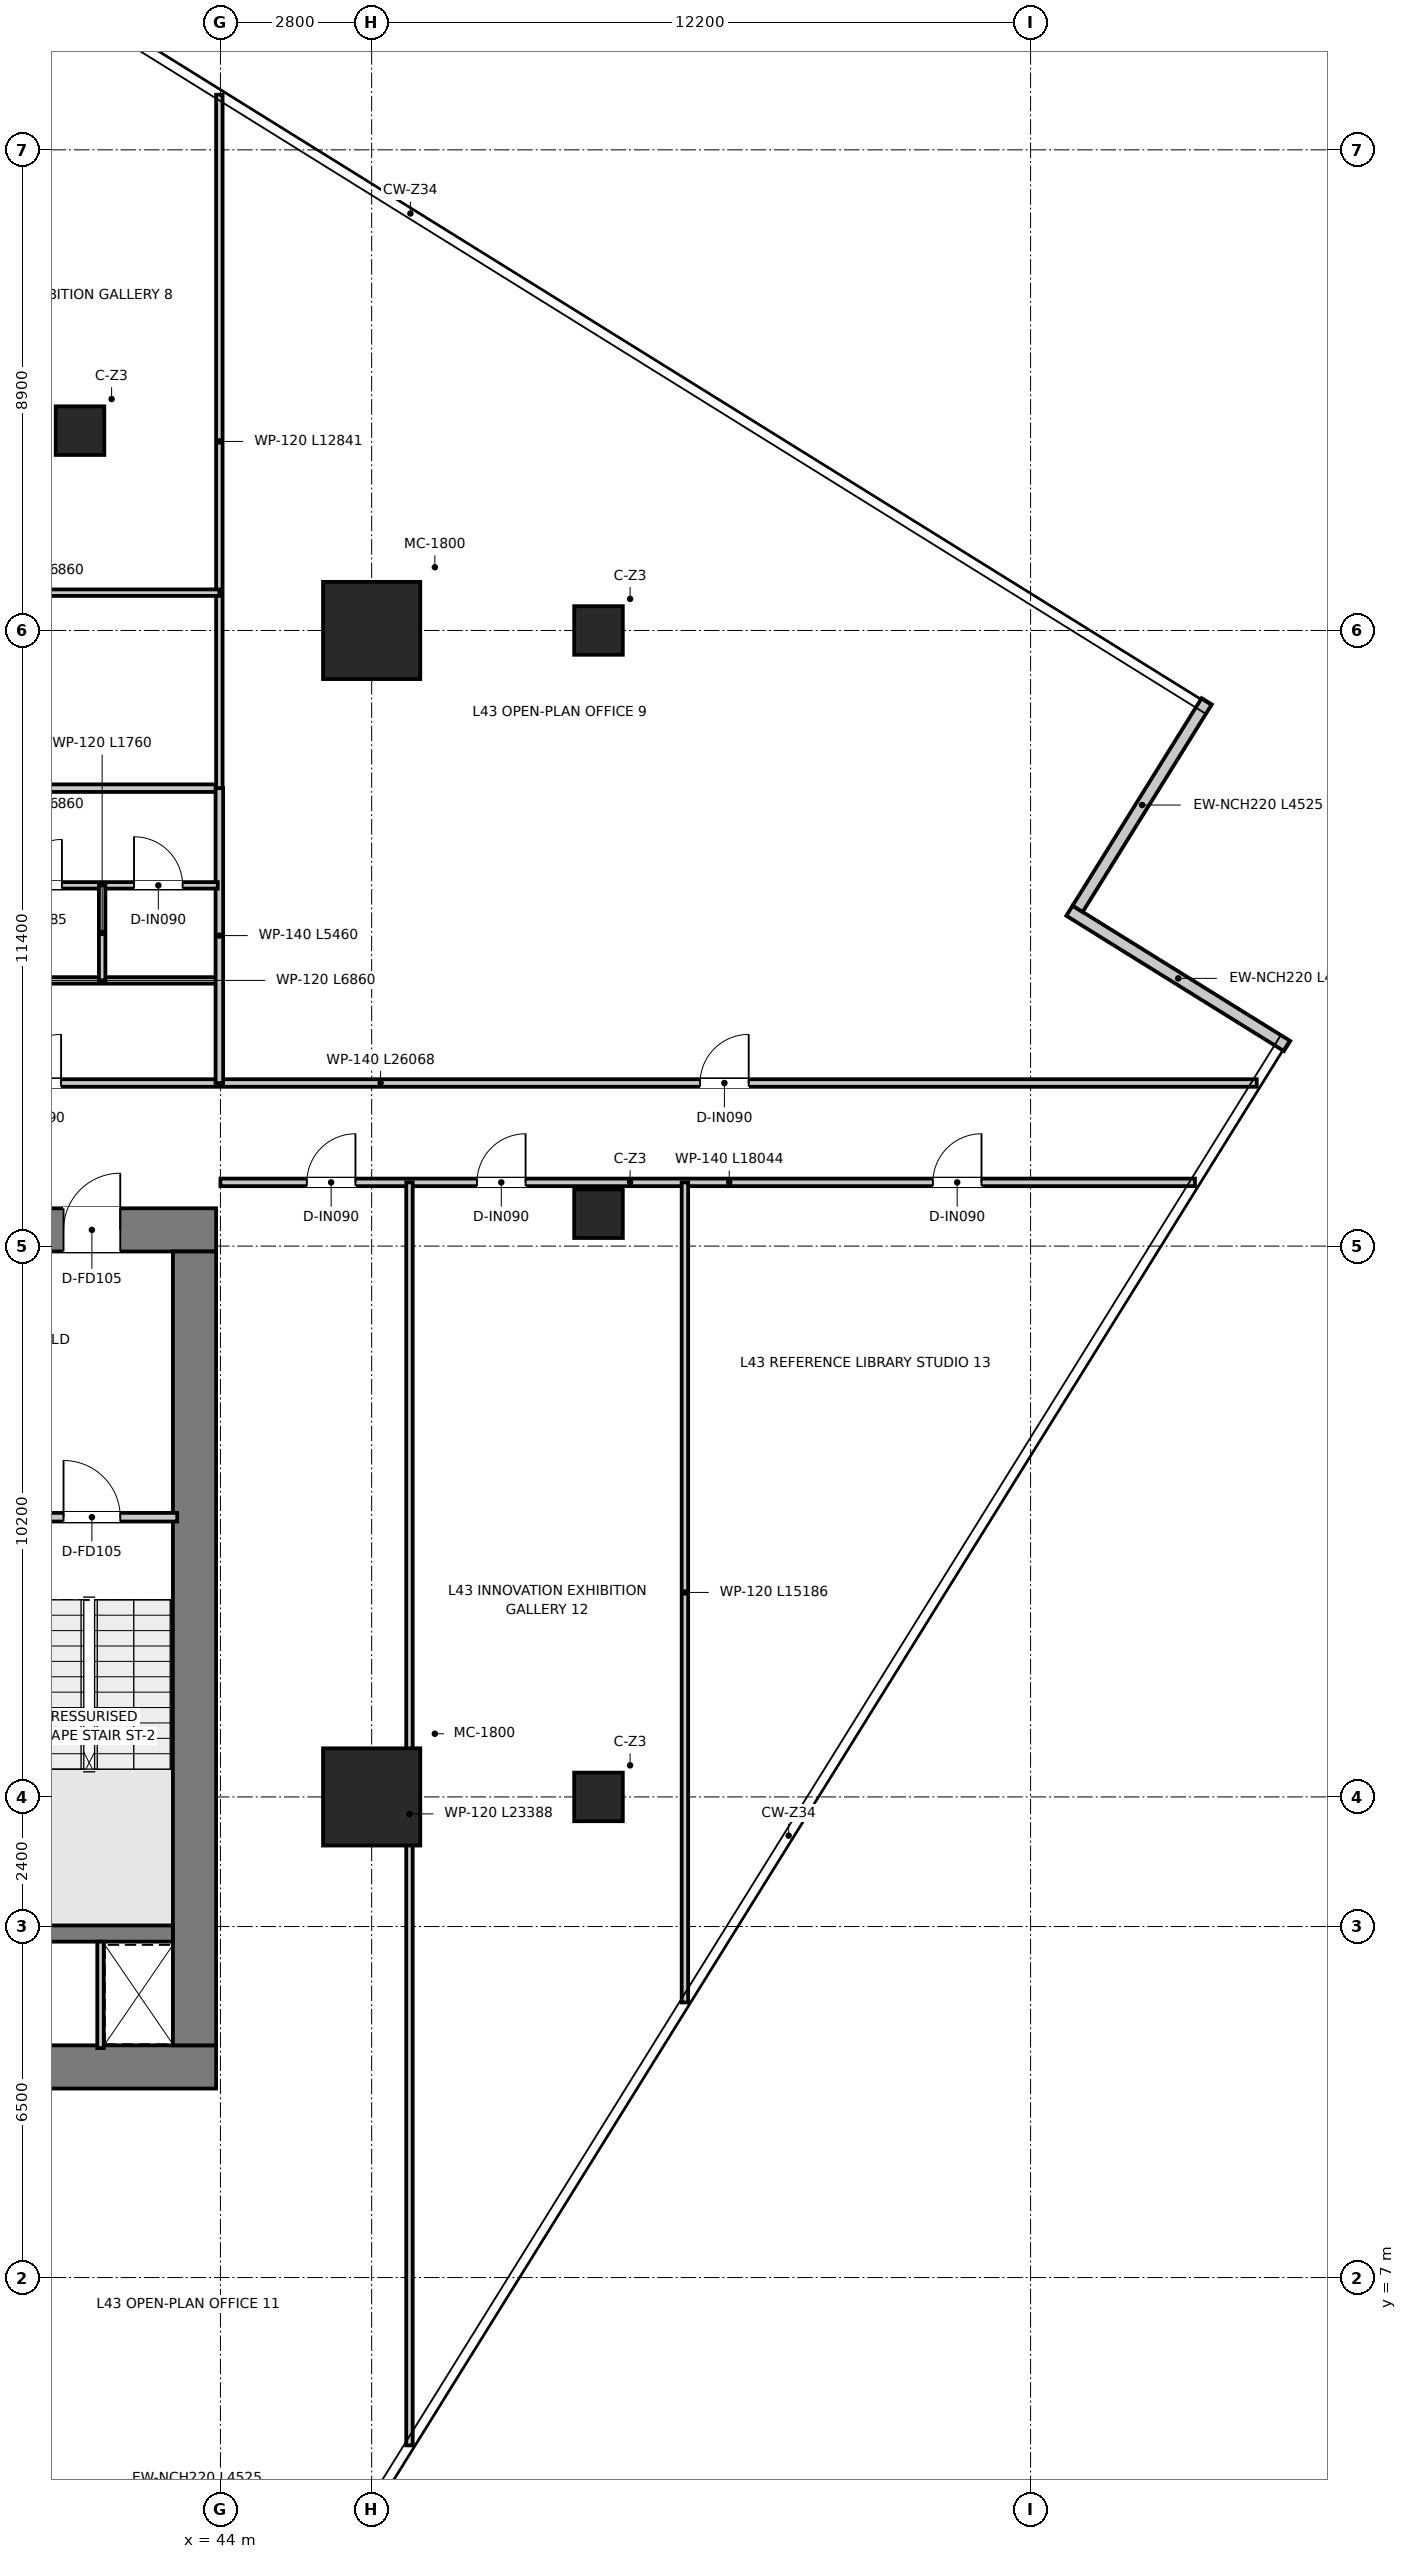
"""IFC4 building model, lengths in metres.
Left out: names, types, materials, properties, quantities, classifications, styles, units other than length and angle.
Written with IfcOpenShell. Run it as: python <this file> out.ifc"""

import sys

from ifc_helpers import new_model, si_unit, direction, frame, frame_2d, origin, origin_2d, place, context, subcontext, project, spatial, rectangle, extrude, source, transform, mapped, element, fill, save


model = new_model("IFC4")
c1 = context("Model", 3, precision=1e-05, world=origin(), true_north=direction((0.0, 1.0)))
c2 = subcontext(c1, "Body", "Model", "MODEL_VIEW")
j1 = project(units=[si_unit("LENGTHUNIT", "METRE"), si_unit("PLANEANGLEUNIT", "RADIAN")], contexts=[c1])
p1 = place(None, origin())
s1 = spatial("IfcSite", under=j1, at=p1, CompositionType="ELEMENT")
p2 = place(p1, origin())
s2 = spatial("IfcBuilding", under=s1, at=p2, CompositionType="ELEMENT")
p3 = place(p2, frame((0.0, 0.0, 177.8)))
s3 = spatial("IfcBuildingStorey", under=s2, at=p3, CompositionType="ELEMENT", Elevation=177.8)
p4 = place(p3, frame((28.08, 10.9, 0.0), z_axis=(0.0, 0.0, 1.0), x_axis=(1.0, 0.0, 0.0)))
e1 = element("IfcWall", 1, at=p4, inside=s3, PredefinedType="SHEAR", context=c2, shape_type="SweptSolid", body=[
    extrude(rectangle(XDim=15.84, YDim=0.8, at=frame_2d((7.92, 0.0))), origin(), (0.0, 0.0, 1.0), 3.95),
])
p5 = place(p3, frame((28.08, 26.4, 0.0), z_axis=(0.0, 0.0, 1.0), x_axis=(1.0, 0.0, 0.0)))
e2 = element("IfcWall", 2, at=p5, inside=s3, PredefinedType="SHEAR", context=c2, shape_type="SweptSolid", body=[
    extrude(rectangle(XDim=15.84, YDim=0.8, at=frame_2d((7.92, 0.0))), origin(), (0.0, 0.0, 1.0), 3.95),
])
p6 = place(p5, frame((7.22, 0.0, 0.0)))
e3 = element("IfcOpeningElement", 3, at=p6, cuts=e2, PredefinedType="OPENING", context=c2, shape_type="SweptSolid", body=[
    extrude(rectangle(XDim=1.4, YDim=2.2, at=frame_2d((0.7, 1.1))), frame((0.0, 0.41, 0.0), z_axis=(0.0, -1.0, 0.0), x_axis=(1.0, 0.0, 0.0)), (0.0, 0.0, 1.0), 0.82),
])
p7 = place(p5, frame((1.775, 0.0, 0.0)))
e4 = element("IfcOpeningElement", 4, at=p7, cuts=e2, PredefinedType="OPENING", context=c2, shape_type="SweptSolid", body=[
    extrude(rectangle(XDim=1.05, YDim=2.1, at=frame_2d((0.525, 1.05))), frame((0.0, 0.41, 0.0), z_axis=(0.0, -1.0, 0.0), x_axis=(1.0, 0.0, 0.0)), (0.0, 0.0, 1.0), 0.82),
])
p8 = place(p5, frame((13.015, 0.0, 0.0)))
e5 = element("IfcOpeningElement", 5, at=p8, cuts=e2, PredefinedType="OPENING", context=c2, shape_type="SweptSolid", body=[
    extrude(rectangle(XDim=1.05, YDim=2.1, at=frame_2d((0.525, 1.05))), frame((0.0, 0.41, 0.0), z_axis=(0.0, -1.0, 0.0), x_axis=(1.0, 0.0, 0.0)), (0.0, 0.0, 1.0), 0.82),
])
p9 = place(p3, frame((43.52, 11.3, 0.0), z_axis=(0.0, 0.0, 1.0), x_axis=(0.0, 1.0, 0.0)))
e6 = element("IfcWall", 6, at=p9, inside=s3, PredefinedType="SHEAR", context=c2, shape_type="SweptSolid", body=[
    extrude(rectangle(XDim=14.7, YDim=0.8, at=frame_2d((7.35, 0.0))), origin(), (0.0, 0.0, 1.0), 3.95),
])
p10 = place(p3, frame((40.02, 13.37, 0.0), z_axis=(0.0, 0.0, 1.0), x_axis=(1.0, 0.0, 0.0)))
e7 = element("IfcWall", 7, at=p10, inside=s3, PredefinedType="SHEAR", context=c2, shape_type="SweptSolid", body=[
    extrude(rectangle(XDim=3.1, YDim=0.3, at=frame_2d((1.55, 0.0))), origin(), (0.0, 0.0, 1.0), 3.95),
])
m1 = source(origin(), c2, "Body", "SweptSolid", [
    extrude(rectangle(XDim=1.8, YDim=1.8, at=origin_2d()), origin(), (0.0, 0.0, 1.0), 3.95),
])
for number, where, z_axis, x_axis in (
    (8, (46.8, 15.9, 0.0), (0.0, 0.0, 1.0), (1.0, 0.0, 0.0)),
    (9, (46.8, 37.5, 0.0), (0.0, 0.0, 1.0), (1.0, 0.0, 0.0)),
):
    element("IfcColumn", number, at=place(p3, frame(where, z_axis=z_axis, x_axis=x_axis)), inside=s3, PredefinedType="USERDEFINED", context=c2, shape_type="MappedRepresentation", body=[
        mapped(m1, transform((0.0, 0.0, 0.0), x_axis=(1.0, 0.0, 0.0), y_axis=(0.0, 1.0, 0.0), z_axis=(0.0, 0.0, 1.0), scale=1.0)),
    ])
m2 = source(origin(), c2, "Body", "SweptSolid", [
    extrude(rectangle(XDim=0.9, YDim=0.9, at=origin_2d()), origin(), (0.0, 0.0, 1.0), 3.95),
])
for number, where, z_axis, x_axis in (
    (10, (41.4, 41.2, 0.0), (0.0, 0.0, 1.0), (1.0, 0.0, 0.0)),
    (11, (51.0, 37.5, 0.0), (0.0, 0.0, 1.0), (1.0, 0.0, 0.0)),
    (12, (51.0, 26.7, 0.0), (0.0, 0.0, 1.0), (1.0, 0.0, 0.0)),
    (13, (51.0, 15.9, 0.0), (0.0, 0.0, 1.0), (1.0, 0.0, 0.0)),
):
    element("IfcColumn", number, at=place(p3, frame(where, z_axis=z_axis, x_axis=x_axis)), inside=s3, PredefinedType="COLUMN", context=c2, shape_type="MappedRepresentation", body=[
        mapped(m2, transform((0.0, 0.0, 0.0), x_axis=(1.0, 0.0, 0.0), y_axis=(0.0, 1.0, 0.0), z_axis=(0.0, 0.0, 1.0), scale=1.0)),
    ])
p11 = place(p3, frame((63.749, 29.805, 0.0), z_axis=(0.0, 0.0, 1.0), x_axis=(-0.84921299194, 0.528050465694, 0.0)))
e14 = element("IfcWall", 14, at=p11, inside=s3, PredefinedType="ELEMENTEDWALL", context=c2, shape_type="SweptSolid", body=[
    extrude(rectangle(XDim=4.745, YDim=0.22, at=frame_2d((2.373, 0.0))), origin(), (0.0, 0.0, 1.0), 3.67),
])
p12 = place(p3, frame((59.871, 32.346, 0.0), z_axis=(0.0, 0.0, 1.0), x_axis=(0.528062437074, 0.849205547881, 0.0)))
e15 = element("IfcWall", 15, at=p12, inside=s3, PredefinedType="ELEMENTEDWALL", context=c2, shape_type="SweptSolid", body=[
    extrude(rectangle(XDim=4.525, YDim=0.22, at=frame_2d((2.262, 0.0))), origin(), (0.0, 0.0, 1.0), 3.67),
])
p13 = place(p3, frame((40.04, 21.08, 0.0), z_axis=(0.0, 0.0, 1.0), x_axis=(1.0, 0.0, 0.0)))
e16 = element("IfcWall", 16, at=p13, inside=s3, PredefinedType="PARTITIONING", context=c2, shape_type="SweptSolid", body=[
    extrude(rectangle(XDim=3.16, YDim=0.16, at=frame_2d((1.58, 0.0))), origin(), (0.0, 0.0, 1.0), 3.67),
])
p14 = place(p13, frame((1.055, 0.0, 0.0)))
e17 = element("IfcOpeningElement", 17, at=p14, cuts=e16, PredefinedType="OPENING", context=c2, shape_type="SweptSolid", body=[
    extrude(rectangle(XDim=1.05, YDim=2.1, at=frame_2d((0.525, 1.05))), frame((0.0, 0.09, 0.0), z_axis=(0.0, -1.0, 0.0), x_axis=(1.0, 0.0, 0.0)), (0.0, 0.0, 1.0), 0.18),
])
p15 = place(p3, frame((41.78, 11.25, 0.0), z_axis=(0.0, 0.0, 1.0), x_axis=(0.0, 1.0, 0.0)))
e18 = element("IfcWall", 18, at=p15, inside=s3, PredefinedType="PARTITIONING", context=c2, shape_type="SweptSolid", body=[
    extrude(rectangle(XDim=1.97, YDim=0.12, at=frame_2d((0.985, 0.0))), origin(), (0.0, 0.0, 1.0), 3.67),
])
p16 = place(p3, frame((37.12, 29.12, 0.0), z_axis=(0.0, 0.0, 1.0), x_axis=(1.0, 0.0, 0.0)))
e19 = element("IfcWall", 19, at=p16, inside=s3, PredefinedType="PARTITIONING", context=c2, shape_type="SweptSolid", body=[
    extrude(rectangle(XDim=26.068, YDim=0.14, at=frame_2d((13.034, 0.0))), origin(), (0.0, 0.0, 1.0), 3.03),
])
p17 = place(p16, frame((3.03, 0.0, 0.0)))
e20 = element("IfcOpeningElement", 20, at=p17, cuts=e19, PredefinedType="OPENING", context=c2, shape_type="SweptSolid", body=[
    extrude(rectangle(XDim=0.9, YDim=2.1, at=frame_2d((0.45, 1.05))), frame((0.0, 0.08, 0.0), z_axis=(0.0, -1.0, 0.0), x_axis=(1.0, 0.0, 0.0)), (0.0, 0.0, 1.0), 0.16),
])
p18 = place(p16, frame((15.761, 0.0, 0.0)))
e21 = element("IfcOpeningElement", 21, at=p18, cuts=e19, PredefinedType="OPENING", context=c2, shape_type="SweptSolid", body=[
    extrude(rectangle(XDim=0.9, YDim=2.1, at=frame_2d((0.45, 1.05))), frame((0.0, 0.08, 0.0), z_axis=(0.0, -1.0, 0.0), x_axis=(1.0, 0.0, 0.0)), (0.0, 0.0, 1.0), 0.16),
])
p19 = place(p3, frame((44.0, 27.28, 0.0), z_axis=(0.0, 0.0, 1.0), x_axis=(1.0, 0.0, 0.0)))
e22 = element("IfcWall", 22, at=p19, inside=s3, PredefinedType="PARTITIONING", context=c2, shape_type="SweptSolid", body=[
    extrude(rectangle(XDim=18.044, YDim=0.14, at=frame_2d((9.022, 0.0))), origin(), (0.0, 0.0, 1.0), 3.03),
])
p20 = place(p19, frame((1.6, 0.0, 0.0)))
e23 = element("IfcOpeningElement", 23, at=p20, cuts=e22, PredefinedType="OPENING", context=c2, shape_type="SweptSolid", body=[
    extrude(rectangle(XDim=0.9, YDim=2.1, at=frame_2d((0.45, 1.05))), frame((0.0, 0.08, 0.0), z_axis=(0.0, -1.0, 0.0), x_axis=(1.0, 0.0, 0.0)), (0.0, 0.0, 1.0), 0.16),
])
p21 = place(p19, frame((4.75, 0.0, 0.0)))
e24 = element("IfcOpeningElement", 24, at=p21, cuts=e22, PredefinedType="OPENING", context=c2, shape_type="SweptSolid", body=[
    extrude(rectangle(XDim=0.9, YDim=2.1, at=frame_2d((0.45, 1.05))), frame((0.0, 0.08, 0.0), z_axis=(0.0, -1.0, 0.0), x_axis=(1.0, 0.0, 0.0)), (0.0, 0.0, 1.0), 0.16),
])
p22 = place(p19, frame((13.191, 0.0, 0.0)))
e25 = element("IfcOpeningElement", 25, at=p22, cuts=e22, PredefinedType="OPENING", context=c2, shape_type="SweptSolid", body=[
    extrude(rectangle(XDim=0.9, YDim=2.1, at=frame_2d((0.45, 1.05))), frame((0.0, 0.08, 0.0), z_axis=(0.0, -1.0, 0.0), x_axis=(1.0, 0.0, 0.0)), (0.0, 0.0, 1.0), 0.16),
])
p23 = place(p3, frame((37.12, 31.02, 0.0), z_axis=(0.0, 0.0, 1.0), x_axis=(1.0, 0.0, 0.0)))
e26 = element("IfcWall", 26, at=p23, inside=s3, PredefinedType="PARTITIONING", context=c2, shape_type="SweptSolid", body=[
    extrude(rectangle(XDim=6.86, YDim=0.12, at=frame_2d((3.43, 0.0))), origin(), (0.0, 0.0, 1.0), 3.08),
])
p24 = place(p3, frame((37.12, 34.58, 0.0), z_axis=(0.0, 0.0, 1.0), x_axis=(1.0, 0.0, 0.0)))
e27 = element("IfcWall", 27, at=p24, inside=s3, PredefinedType="PARTITIONING", context=c2, shape_type="SweptSolid", body=[
    extrude(rectangle(XDim=6.86, YDim=0.14, at=frame_2d((3.43, 0.0))), origin(), (0.0, 0.0, 1.0), 3.08),
])
p25 = place(p3, frame((43.98, 29.12, 0.0), z_axis=(0.0, 0.0, 1.0), x_axis=(0.0, 1.0, 0.0)))
e28 = element("IfcWall", 28, at=p25, inside=s3, PredefinedType="PARTITIONING", context=c2, shape_type="SweptSolid", body=[
    extrude(rectangle(XDim=5.46, YDim=0.14, at=frame_2d((2.73, 0.0))), origin(), (0.0, 0.0, 1.0), 3.31),
])
p26 = place(p3, frame((37.15, 32.78, 0.0), z_axis=(0.0, 0.0, 1.0), x_axis=(1.0, 0.0, 0.0)))
e29 = element("IfcWall", 29, at=p26, inside=s3, PredefinedType="PARTITIONING", context=c2, shape_type="SweptSolid", body=[
    extrude(rectangle(XDim=6.8, YDim=0.12, at=frame_2d((3.4, 0.0))), origin(), (0.0, 0.0, 1.0), 3.08),
])
p27 = place(p26, frame((0.725, 0.0, 0.0)))
e30 = element("IfcOpeningElement", 30, at=p27, cuts=e29, PredefinedType="OPENING", context=c2, shape_type="SweptSolid", body=[
    extrude(rectangle(XDim=0.85, YDim=2.1, at=frame_2d((0.425, 1.05))), frame((0.0, 0.07, 0.0), z_axis=(0.0, -1.0, 0.0), x_axis=(1.0, 0.0, 0.0)), (0.0, 0.0, 1.0), 0.14),
])
p28 = place(p26, frame((3.065, 0.0, 0.0)))
e31 = element("IfcOpeningElement", 31, at=p28, cuts=e29, PredefinedType="OPENING", context=c2, shape_type="SweptSolid", body=[
    extrude(rectangle(XDim=0.85, YDim=2.1, at=frame_2d((0.425, 1.05))), frame((0.0, 0.07, 0.0), z_axis=(0.0, -1.0, 0.0), x_axis=(1.0, 0.0, 0.0)), (0.0, 0.0, 1.0), 0.14),
])
p29 = place(p26, frame((5.25, 0.0, 0.0)))
e32 = element("IfcOpeningElement", 32, at=p29, cuts=e29, PredefinedType="OPENING", context=c2, shape_type="SweptSolid", body=[
    extrude(rectangle(XDim=0.9, YDim=2.1, at=frame_2d((0.45, 1.05))), frame((0.0, 0.07, 0.0), z_axis=(0.0, -1.0, 0.0), x_axis=(1.0, 0.0, 0.0)), (0.0, 0.0, 1.0), 0.14),
])
p30 = place(p3, frame((41.81, 31.02, 0.0), z_axis=(0.0, 0.0, 1.0), x_axis=(0.0, 1.0, 0.0)))
e33 = element("IfcWall", 33, at=p30, inside=s3, PredefinedType="PARTITIONING", context=c2, shape_type="SweptSolid", body=[
    extrude(rectangle(XDim=1.76, YDim=0.12, at=frame_2d((0.88, 0.0))), origin(), (0.0, 0.0, 1.0), 3.67),
])
p31 = place(p3, frame((43.98, 34.58, 0.0), z_axis=(0.0, 0.0, 1.0), x_axis=(0.0, 1.0, 0.0)))
e34 = element("IfcWall", 34, at=p31, inside=s3, PredefinedType="PARTITIONING", context=c2, shape_type="SweptSolid", body=[
    extrude(rectangle(XDim=12.841, YDim=0.12, at=frame_2d((6.42, 0.0))), origin(), (0.0, 0.0, 1.0), 3.03),
])
p32 = place(p3, frame((37.12, 38.2, 0.0), z_axis=(0.0, 0.0, 1.0), x_axis=(1.0, 0.0, 0.0)))
e35 = element("IfcWall", 35, at=p32, inside=s3, PredefinedType="PARTITIONING", context=c2, shape_type="SweptSolid", body=[
    extrude(rectangle(XDim=6.86, YDim=0.12, at=frame_2d((3.43, 0.0))), origin(), (0.0, 0.0, 1.0), 3.08),
])
p33 = place(p3, frame((47.5, 3.892, 0.0), z_axis=(0.0, 0.0, 1.0), x_axis=(0.0, 1.0, 0.0)))
e36 = element("IfcWall", 36, at=p33, inside=s3, PredefinedType="PARTITIONING", context=c2, shape_type="SweptSolid", body=[
    extrude(rectangle(XDim=23.388, YDim=0.12, at=frame_2d((11.694, 0.0))), origin(), (0.0, 0.0, 1.0), 3.08),
])
p34 = place(p3, frame((52.6, 12.094, 0.0), z_axis=(0.0, 0.0, 1.0), x_axis=(0.0, 1.0, 0.0)))
e37 = element("IfcWall", 37, at=p34, inside=s3, PredefinedType="PARTITIONING", context=c2, shape_type="SweptSolid", body=[
    extrude(rectangle(XDim=15.187, YDim=0.12, at=frame_2d((7.593, 0.0))), origin(), (0.0, 0.0, 1.0), 3.67),
])
p35 = place(p14, origin())
e38 = element("IfcDoor", 38, at=p35, inside=s3, OperationType="SINGLE_SWING_LEFT", PredefinedType="DOOR", context=c2, shape_type="SweptSolid", body=[
    extrude(rectangle(XDim=1.05, YDim=2.1, at=frame_2d((0.525, 1.05))), frame((0.0, 0.025, 0.0), z_axis=(0.0, -1.0, 0.0), x_axis=(1.0, 0.0, 0.0)), (0.0, 0.0, 1.0), 0.05),
])
fill(e17, e38)
p36 = place(p8, origin())
e39 = element("IfcDoor", 39, at=p36, inside=s3, OperationType="SINGLE_SWING_RIGHT", PredefinedType="DOOR", context=c2, shape_type="SweptSolid", body=[
    extrude(rectangle(XDim=1.05, YDim=2.1, at=frame_2d((0.525, 1.05))), frame((0.0, 0.025, 0.0), z_axis=(0.0, -1.0, 0.0), x_axis=(1.0, 0.0, 0.0)), (0.0, 0.0, 1.0), 0.05),
])
fill(e5, e39)
p37 = place(p17, origin())
e40 = element("IfcDoor", 40, at=p37, inside=s3, OperationType="SINGLE_SWING_RIGHT", PredefinedType="DOOR", context=c2, shape_type="SweptSolid", body=[
    extrude(rectangle(XDim=0.9, YDim=2.1, at=frame_2d((0.45, 1.05))), frame((0.0, 0.025, 0.0), z_axis=(0.0, -1.0, 0.0), x_axis=(1.0, 0.0, 0.0)), (0.0, 0.0, 1.0), 0.05),
])
fill(e20, e40)
p38 = place(p28, origin())
e41 = element("IfcDoor", 41, at=p38, inside=s3, OperationType="SINGLE_SWING_RIGHT", PredefinedType="DOOR", context=c2, shape_type="SweptSolid", body=[
    extrude(rectangle(XDim=0.85, YDim=2.1, at=frame_2d((0.425, 1.05))), frame((0.0, 0.025, 0.0), z_axis=(0.0, -1.0, 0.0), x_axis=(1.0, 0.0, 0.0)), (0.0, 0.0, 1.0), 0.05),
])
fill(e31, e41)
p39 = place(p29, origin())
e42 = element("IfcDoor", 42, at=p39, inside=s3, OperationType="SINGLE_SWING_LEFT", PredefinedType="DOOR", context=c2, shape_type="SweptSolid", body=[
    extrude(rectangle(XDim=0.9, YDim=2.1, at=frame_2d((0.45, 1.05))), frame((0.0, 0.025, 0.0), z_axis=(0.0, -1.0, 0.0), x_axis=(1.0, 0.0, 0.0)), (0.0, 0.0, 1.0), 0.05),
])
fill(e32, e42)
p40 = place(p18, origin())
e43 = element("IfcDoor", 43, at=p40, inside=s3, OperationType="SINGLE_SWING_RIGHT", PredefinedType="DOOR", context=c2, shape_type="SweptSolid", body=[
    extrude(rectangle(XDim=0.9, YDim=2.1, at=frame_2d((0.45, 1.05))), frame((0.0, 0.025, 0.0), z_axis=(0.0, -1.0, 0.0), x_axis=(1.0, 0.0, 0.0)), (0.0, 0.0, 1.0), 0.05),
])
fill(e21, e43)
p41 = place(p20, origin())
e44 = element("IfcDoor", 44, at=p41, inside=s3, OperationType="SINGLE_SWING_RIGHT", PredefinedType="DOOR", context=c2, shape_type="SweptSolid", body=[
    extrude(rectangle(XDim=0.9, YDim=2.1, at=frame_2d((0.45, 1.05))), frame((0.0, 0.025, 0.0), z_axis=(0.0, -1.0, 0.0), x_axis=(1.0, 0.0, 0.0)), (0.0, 0.0, 1.0), 0.05),
])
fill(e23, e44)
p42 = place(p21, origin())
e45 = element("IfcDoor", 45, at=p42, inside=s3, OperationType="SINGLE_SWING_RIGHT", PredefinedType="DOOR", context=c2, shape_type="SweptSolid", body=[
    extrude(rectangle(XDim=0.9, YDim=2.1, at=frame_2d((0.45, 1.05))), frame((0.0, 0.025, 0.0), z_axis=(0.0, -1.0, 0.0), x_axis=(1.0, 0.0, 0.0)), (0.0, 0.0, 1.0), 0.05),
])
fill(e24, e45)
p43 = place(p22, origin())
e46 = element("IfcDoor", 46, at=p43, inside=s3, OperationType="SINGLE_SWING_RIGHT", PredefinedType="DOOR", context=c2, shape_type="SweptSolid", body=[
    extrude(rectangle(XDim=0.9, YDim=2.1, at=frame_2d((0.45, 1.05))), frame((0.0, 0.025, 0.0), z_axis=(0.0, -1.0, 0.0), x_axis=(1.0, 0.0, 0.0)), (0.0, 0.0, 1.0), 0.05),
])
fill(e25, e46)
save(model, sys.argv[1])
